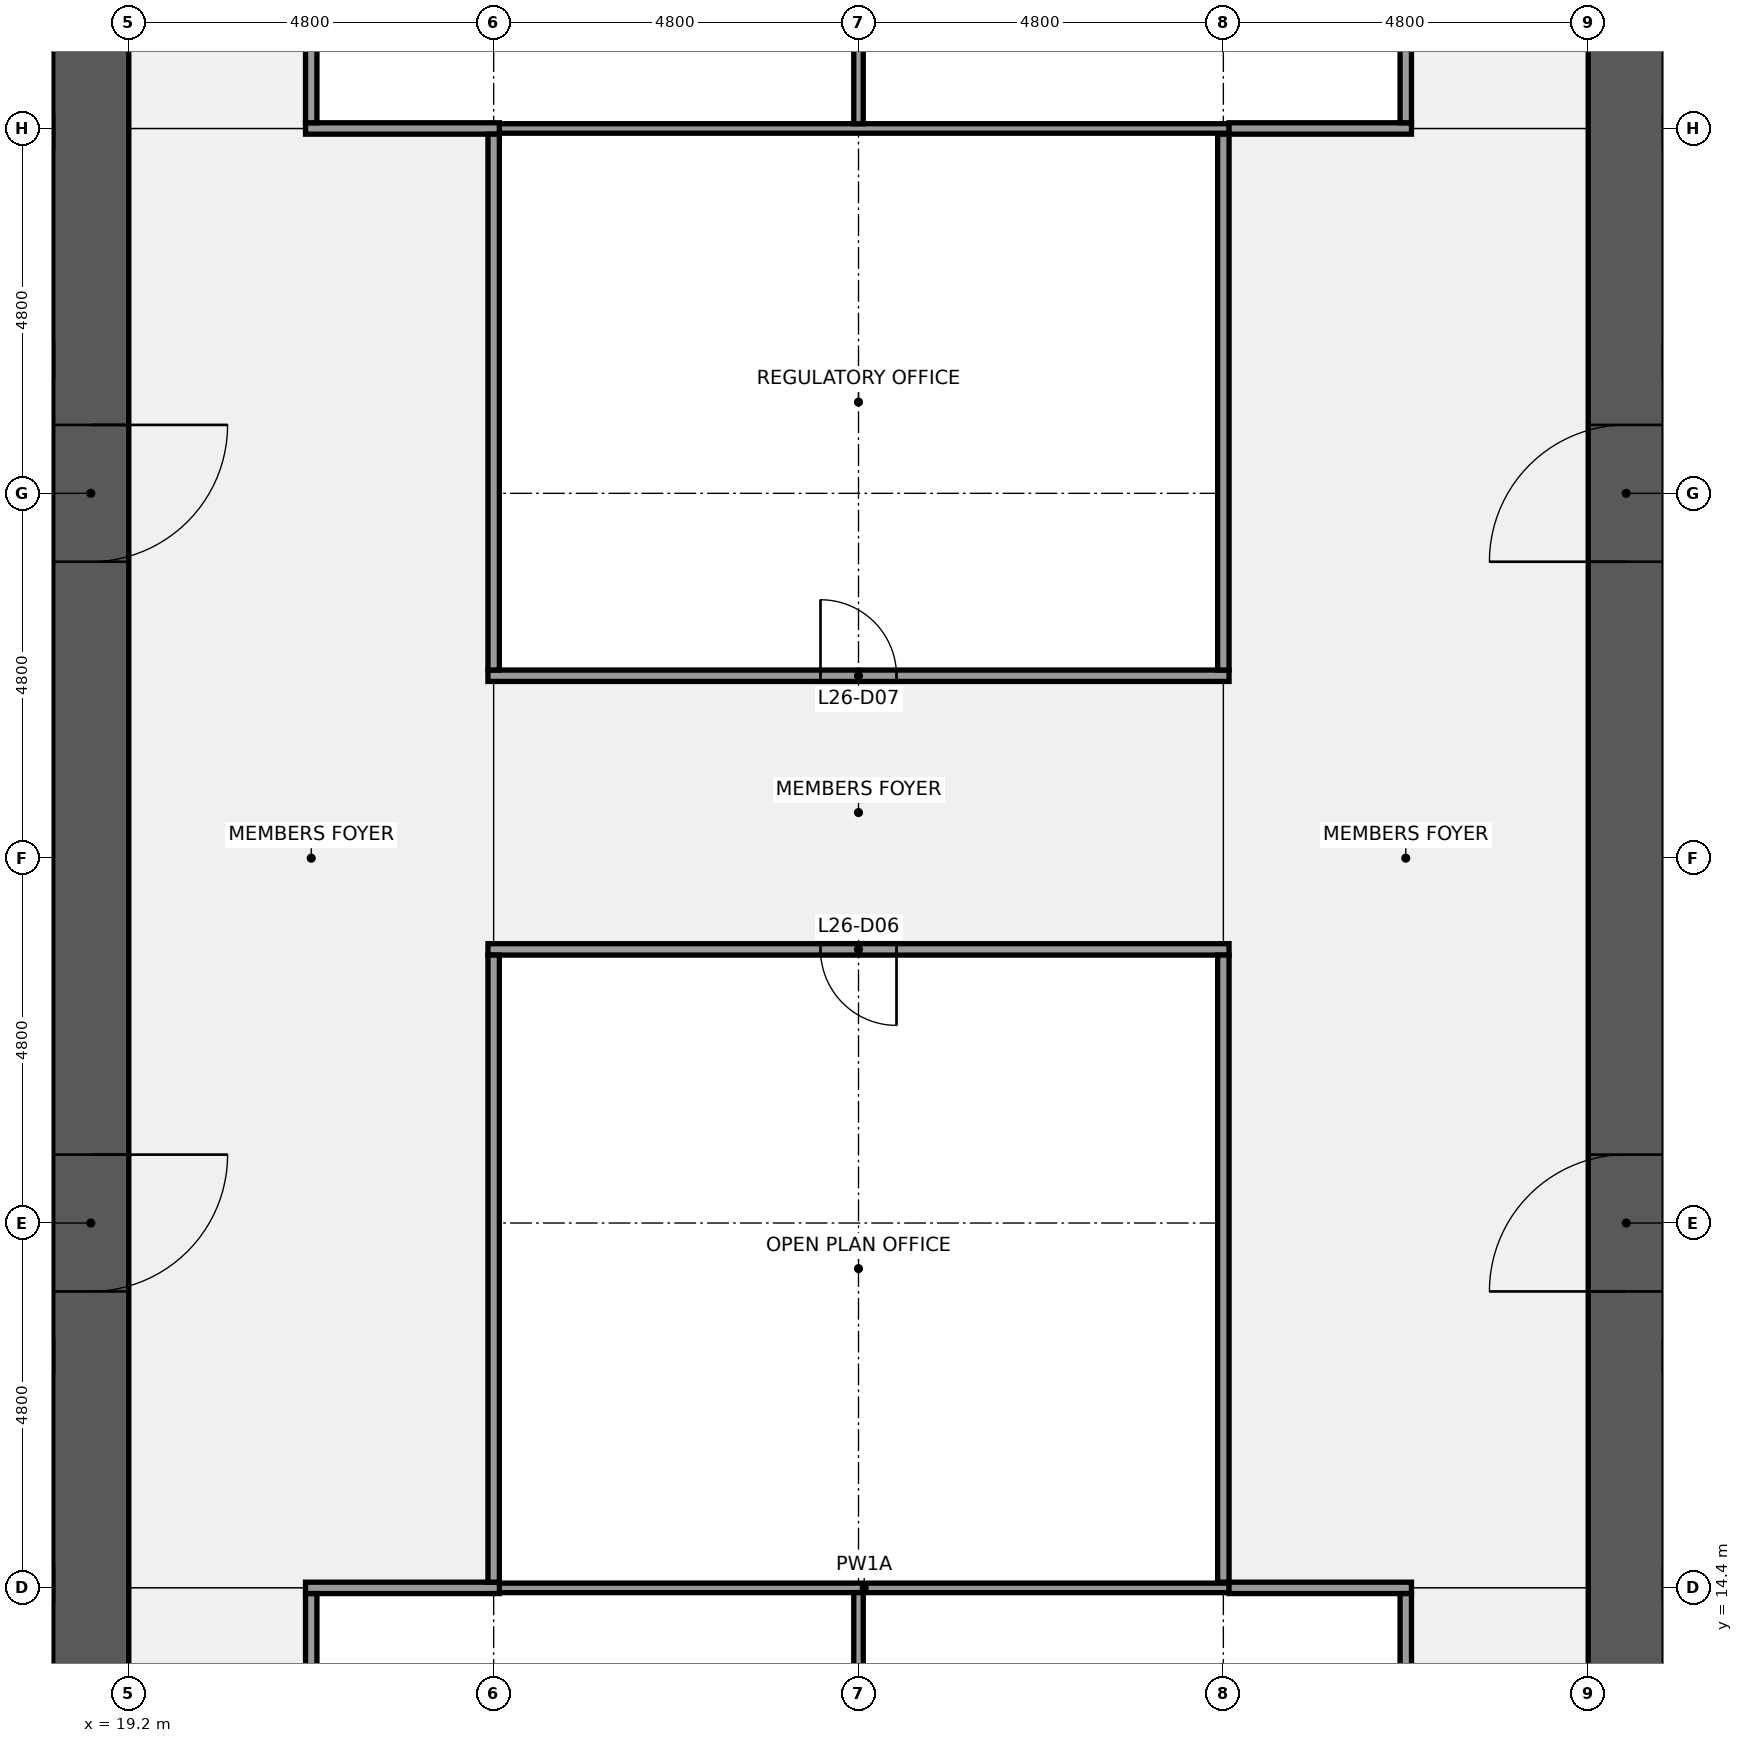
"""IFC4 building model, lengths in metres.
Left out: names, types, materials, properties, quantities, classifications, styles, units other than length and angle.
Written with IfcOpenShell. Run it as: python <this file> out.ifc"""

import sys

from ifc_helpers import new_model, si_unit, direction, frame, frame_2d, origin, place, context, subcontext, project, spatial, rectangle, extrude, element, fill, save


model = new_model("IFC4")
c1 = context("Model", 3, precision=1e-05, world=origin(), true_north=direction((0.0, 1.0)))
c2 = subcontext(c1, "Body", "Model", "MODEL_VIEW")
j1 = project(units=[si_unit("LENGTHUNIT", "METRE"), si_unit("PLANEANGLEUNIT", "RADIAN")], contexts=[c1])
p1 = place(None, origin())
s1 = spatial("IfcSite", under=j1, at=p1, CompositionType="ELEMENT")
p2 = place(p1, origin())
s2 = spatial("IfcBuilding", under=s1, at=p2, CompositionType="ELEMENT")
p3 = place(p2, frame((0.0, 0.0, 124.1)))
s3 = spatial("IfcBuildingStorey", under=s2, at=p3, CompositionType="ELEMENT", Elevation=124.1)
p4 = place(p3, frame((18.7, 38.4, 0.0), z_axis=(0.0, 0.0, 1.0), x_axis=(0.0, -1.0, 0.0)))
e1 = element("IfcWall", 1, at=p4, inside=s3, PredefinedType="SHEAR", context=c2, shape_type="SweptSolid", body=[
    extrude(rectangle(XDim=28.8, YDim=1.0, at=frame_2d((14.4, 0.0))), origin(), (0.0, 0.0, 1.0), 3.84),
])
p5 = place(p4, frame((18.3, 0.0, 0.0)))
e2 = element("IfcOpeningElement", 2, at=p5, cuts=e1, PredefinedType="OPENING", context=c2, shape_type="SweptSolid", body=[
    extrude(rectangle(XDim=1.8, YDim=2.1, at=frame_2d((0.9, 1.05))), frame((0.0, 0.51, 0.0), z_axis=(0.0, -1.0, 0.0), x_axis=(1.0, 0.0, 0.0)), (0.0, 0.0, 1.0), 1.02),
])
p6 = place(p4, frame((8.7, 0.0, 0.0)))
e3 = element("IfcOpeningElement", 3, at=p6, cuts=e1, PredefinedType="OPENING", context=c2, shape_type="SweptSolid", body=[
    extrude(rectangle(XDim=1.8, YDim=2.1, at=frame_2d((0.9, 1.05))), frame((0.0, 0.51, 0.0), z_axis=(0.0, -1.0, 0.0), x_axis=(1.0, 0.0, 0.0)), (0.0, 0.0, 1.0), 1.02),
])
p7 = place(p3, frame((1.0, 14.45, 0.0), z_axis=(0.0, 0.0, 1.0), x_axis=(1.0, 0.0, 0.0)))
e4 = element("IfcWall", 4, at=p7, inside=s3, PredefinedType="SHEAR", context=c2, shape_type="SweptSolid", body=[
    extrude(rectangle(XDim=17.2, YDim=0.4, at=frame_2d((8.6, 0.0))), origin(), (0.0, 0.0, 1.0), 3.84),
])
p8 = place(p3, frame((1.0, 17.45, 0.0), z_axis=(0.0, 0.0, 1.0), x_axis=(1.0, 0.0, 0.0)))
e5 = element("IfcWall", 5, at=p8, inside=s3, PredefinedType="SHEAR", context=c2, shape_type="SweptSolid", body=[
    extrude(rectangle(XDim=17.2, YDim=0.4, at=frame_2d((8.6, 0.0))), origin(), (0.0, 0.0, 1.0), 3.84),
])
p9 = place(p8, frame((0.762, 0.0, 0.0)))
e6 = element("IfcOpeningElement", 6, at=p9, cuts=e5, PredefinedType="OPENING", context=c2, shape_type="SweptSolid", body=[
    extrude(rectangle(XDim=1.0, YDim=2.1, at=frame_2d((0.5, 1.05))), frame((0.0, 0.21, 0.0), z_axis=(0.0, -1.0, 0.0), x_axis=(1.0, 0.0, 0.0)), (0.0, 0.0, 1.0), 0.42),
])
p10 = place(p8, frame((4.5, 0.0, 0.0)))
e7 = element("IfcOpeningElement", 7, at=p10, cuts=e5, PredefinedType="OPENING", context=c2, shape_type="SweptSolid", body=[
    extrude(rectangle(XDim=1.0, YDim=2.1, at=frame_2d((0.5, 1.05))), frame((0.0, 0.21, 0.0), z_axis=(0.0, -1.0, 0.0), x_axis=(1.0, 0.0, 0.0)), (0.0, 0.0, 1.0), 0.42),
])
p11 = place(p8, frame((8.4, 0.0, 0.0)))
e8 = element("IfcOpeningElement", 8, at=p11, cuts=e5, PredefinedType="OPENING", context=c2, shape_type="SweptSolid", body=[
    extrude(rectangle(XDim=1.0, YDim=2.1, at=frame_2d((0.5, 1.05))), frame((0.0, 0.21, 0.0), z_axis=(0.0, -1.0, 0.0), x_axis=(1.0, 0.0, 0.0)), (0.0, 0.0, 1.0), 0.42),
])
p12 = place(p8, frame((11.4, 0.0, 0.0)))
e9 = element("IfcOpeningElement", 9, at=p12, cuts=e5, PredefinedType="OPENING", context=c2, shape_type="SweptSolid", body=[
    extrude(rectangle(XDim=1.0, YDim=2.1, at=frame_2d((0.5, 1.05))), frame((0.0, 0.21, 0.0), z_axis=(0.0, -1.0, 0.0), x_axis=(1.0, 0.0, 0.0)), (0.0, 0.0, 1.0), 0.42),
])
p13 = place(p8, frame((14.837, 0.0, 0.0)))
e10 = element("IfcOpeningElement", 10, at=p13, cuts=e5, PredefinedType="OPENING", context=c2, shape_type="SweptSolid", body=[
    extrude(rectangle(XDim=1.0, YDim=2.1, at=frame_2d((0.5, 1.05))), frame((0.0, 0.21, 0.0), z_axis=(0.0, -1.0, 0.0), x_axis=(1.0, 0.0, 0.0)), (0.0, 0.0, 1.0), 0.42),
])
p14 = place(p3, frame((1.0, 30.55, 0.0), z_axis=(0.0, 0.0, 1.0), x_axis=(1.0, 0.0, 0.0)))
e11 = element("IfcWall", 11, at=p14, inside=s3, PredefinedType="SHEAR", context=c2, shape_type="SweptSolid", body=[
    extrude(rectangle(XDim=17.2, YDim=0.4, at=frame_2d((8.6, 0.0))), origin(), (0.0, 0.0, 1.0), 3.84),
])
p15 = place(p14, frame((1.663, 0.0, 0.0)))
e12 = element("IfcOpeningElement", 12, at=p15, cuts=e11, PredefinedType="OPENING", context=c2, shape_type="SweptSolid", body=[
    extrude(rectangle(XDim=1.0, YDim=2.1, at=frame_2d((0.5, 1.05))), frame((0.0, 0.21, 0.0), z_axis=(0.0, -1.0, 0.0), x_axis=(1.0, 0.0, 0.0)), (0.0, 0.0, 1.0), 0.42),
])
p16 = place(p14, frame((5.7, 0.0, 0.0)))
e13 = element("IfcOpeningElement", 13, at=p16, cuts=e11, PredefinedType="OPENING", context=c2, shape_type="SweptSolid", body=[
    extrude(rectangle(XDim=1.0, YDim=2.1, at=frame_2d((0.5, 1.05))), frame((0.0, 0.21, 0.0), z_axis=(0.0, -1.0, 0.0), x_axis=(1.0, 0.0, 0.0)), (0.0, 0.0, 1.0), 0.42),
])
p17 = place(p14, frame((9.0, 0.0, 0.0)))
e14 = element("IfcOpeningElement", 14, at=p17, cuts=e11, PredefinedType="OPENING", context=c2, shape_type="SweptSolid", body=[
    extrude(rectangle(XDim=1.0, YDim=2.1, at=frame_2d((0.5, 1.05))), frame((0.0, 0.21, 0.0), z_axis=(0.0, -1.0, 0.0), x_axis=(1.0, 0.0, 0.0)), (0.0, 0.0, 1.0), 0.42),
])
p18 = place(p14, frame((11.7, 0.0, 0.0)))
e15 = element("IfcOpeningElement", 15, at=p18, cuts=e11, PredefinedType="OPENING", context=c2, shape_type="SweptSolid", body=[
    extrude(rectangle(XDim=1.0, YDim=2.1, at=frame_2d((0.5, 1.05))), frame((0.0, 0.21, 0.0), z_axis=(0.0, -1.0, 0.0), x_axis=(1.0, 0.0, 0.0)), (0.0, 0.0, 1.0), 0.42),
])
p19 = place(p14, frame((14.837, 0.0, 0.0)))
e16 = element("IfcOpeningElement", 16, at=p19, cuts=e11, PredefinedType="OPENING", context=c2, shape_type="SweptSolid", body=[
    extrude(rectangle(XDim=1.0, YDim=2.1, at=frame_2d((0.5, 1.05))), frame((0.0, 0.21, 0.0), z_axis=(0.0, -1.0, 0.0), x_axis=(1.0, 0.0, 0.0)), (0.0, 0.0, 1.0), 0.42),
])
p20 = place(p3, frame((1.0, 33.55, 0.0), z_axis=(0.0, 0.0, 1.0), x_axis=(1.0, 0.0, 0.0)))
e17 = element("IfcWall", 17, at=p20, inside=s3, PredefinedType="SHEAR", context=c2, shape_type="SweptSolid", body=[
    extrude(rectangle(XDim=17.2, YDim=0.4, at=frame_2d((8.6, 0.0))), origin(), (0.0, 0.0, 1.0), 3.84),
])
p21 = place(p3, frame((38.9, 9.6, 0.0), z_axis=(0.0, 0.0, 1.0), x_axis=(0.0, 1.0, 0.0)))
e18 = element("IfcWall", 18, at=p21, inside=s3, PredefinedType="SHEAR", context=c2, shape_type="SweptSolid", body=[
    extrude(rectangle(XDim=28.8, YDim=1.0, at=frame_2d((14.4, 0.0))), origin(), (0.0, 0.0, 1.0), 3.84),
])
p22 = place(p21, frame((8.7, 0.0, 0.0)))
e19 = element("IfcOpeningElement", 19, at=p22, cuts=e18, PredefinedType="OPENING", context=c2, shape_type="SweptSolid", body=[
    extrude(rectangle(XDim=1.8, YDim=2.1, at=frame_2d((0.9, 1.05))), frame((0.0, 0.51, 0.0), z_axis=(0.0, -1.0, 0.0), x_axis=(1.0, 0.0, 0.0)), (0.0, 0.0, 1.0), 1.02),
])
p23 = place(p21, frame((18.3, 0.0, 0.0)))
e20 = element("IfcOpeningElement", 20, at=p23, cuts=e18, PredefinedType="OPENING", context=c2, shape_type="SweptSolid", body=[
    extrude(rectangle(XDim=1.8, YDim=2.1, at=frame_2d((0.9, 1.05))), frame((0.0, 0.51, 0.0), z_axis=(0.0, -1.0, 0.0), x_axis=(1.0, 0.0, 0.0)), (0.0, 0.0, 1.0), 1.02),
])
p24 = place(p3, frame((24.075, 14.4, 0.0), z_axis=(0.0, 0.0, 1.0), x_axis=(1.0, 0.0, 0.0)))
e21 = element("IfcWall", 21, at=p24, inside=s3, PredefinedType="PARTITIONING", context=c2, shape_type="SweptSolid", body=[
    extrude(rectangle(XDim=9.6, YDim=0.125, at=frame_2d((4.8, 0.0))), origin(), (0.0, 0.0, 1.0), 2.849),
])
p25 = place(p3, frame((21.525, 14.4, 0.0), z_axis=(0.0, 0.0, 1.0), x_axis=(1.0, 0.0, 0.0)))
e22 = element("IfcWall", 22, at=p25, inside=s3, PredefinedType="PARTITIONING", context=c2, shape_type="SweptSolid", body=[
    extrude(rectangle(XDim=2.55, YDim=0.15, at=frame_2d((1.275, 0.0))), origin(), (0.0, 0.0, 1.0), 2.849),
])
p26 = place(p3, frame((33.675, 14.4, 0.0), z_axis=(0.0, 0.0, 1.0), x_axis=(1.0, 0.0, 0.0)))
e23 = element("IfcWall", 23, at=p26, inside=s3, PredefinedType="PARTITIONING", context=c2, shape_type="SweptSolid", body=[
    extrude(rectangle(XDim=2.4, YDim=0.15, at=frame_2d((1.2, 0.0))), origin(), (0.0, 0.0, 1.0), 2.849),
])
p27 = place(p3, frame((23.925, 22.8, 0.0), z_axis=(0.0, 0.0, 1.0), x_axis=(1.0, 0.0, 0.0)))
e24 = element("IfcWall", 24, at=p27, inside=s3, PredefinedType="PARTITIONING", context=c2, shape_type="SweptSolid", body=[
    extrude(rectangle(XDim=9.75, YDim=0.15, at=frame_2d((4.875, 0.0))), origin(), (0.0, 0.0, 1.0), 2.849),
])
p28 = place(p27, frame((4.375, 0.0, 0.0)))
e25 = element("IfcOpeningElement", 25, at=p28, cuts=e24, PredefinedType="OPENING", context=c2, shape_type="SweptSolid", body=[
    extrude(rectangle(XDim=1.0, YDim=2.1, at=frame_2d((0.5, 1.05))), frame((0.0, 0.085, 0.0), z_axis=(0.0, -1.0, 0.0), x_axis=(1.0, 0.0, 0.0)), (0.0, 0.0, 1.0), 0.17),
])
p29 = place(p3, frame((23.925, 26.4, 0.0), z_axis=(0.0, 0.0, 1.0), x_axis=(1.0, 0.0, 0.0)))
e26 = element("IfcWall", 26, at=p29, inside=s3, PredefinedType="PARTITIONING", context=c2, shape_type="SweptSolid", body=[
    extrude(rectangle(XDim=9.75, YDim=0.15, at=frame_2d((4.875, 0.0))), origin(), (0.0, 0.0, 1.0), 2.849),
])
p30 = place(p29, frame((4.375, 0.0, 0.0)))
e27 = element("IfcOpeningElement", 27, at=p30, cuts=e26, PredefinedType="OPENING", context=c2, shape_type="SweptSolid", body=[
    extrude(rectangle(XDim=1.0, YDim=2.1, at=frame_2d((0.5, 1.05))), frame((0.0, 0.085, 0.0), z_axis=(0.0, -1.0, 0.0), x_axis=(1.0, 0.0, 0.0)), (0.0, 0.0, 1.0), 0.17),
])
p31 = place(p3, frame((24.075, 33.6, 0.0), z_axis=(0.0, 0.0, 1.0), x_axis=(1.0, 0.0, 0.0)))
e28 = element("IfcWall", 28, at=p31, inside=s3, PredefinedType="PARTITIONING", context=c2, shape_type="SweptSolid", body=[
    extrude(rectangle(XDim=9.6, YDim=0.125, at=frame_2d((4.8, 0.0))), origin(), (0.0, 0.0, 1.0), 2.849),
])
p32 = place(p3, frame((21.525, 33.6, 0.0), z_axis=(0.0, 0.0, 1.0), x_axis=(1.0, 0.0, 0.0)))
e29 = element("IfcWall", 29, at=p32, inside=s3, PredefinedType="PARTITIONING", context=c2, shape_type="SweptSolid", body=[
    extrude(rectangle(XDim=2.55, YDim=0.15, at=frame_2d((1.275, 0.0))), origin(), (0.0, 0.0, 1.0), 2.849),
])
p33 = place(p3, frame((33.675, 33.6, 0.0), z_axis=(0.0, 0.0, 1.0), x_axis=(1.0, 0.0, 0.0)))
e30 = element("IfcWall", 30, at=p33, inside=s3, PredefinedType="PARTITIONING", context=c2, shape_type="SweptSolid", body=[
    extrude(rectangle(XDim=2.4, YDim=0.15, at=frame_2d((1.2, 0.0))), origin(), (0.0, 0.0, 1.0), 2.849),
])
for number, where, z_axis, x_axis in (
    (31, (21.6, 9.675, 0.0), (0.0, 0.0, 1.0), (0.0, 1.0, 0.0)),
    (32, (21.6, 33.675, 0.0), (0.0, 0.0, 1.0), (0.0, 1.0, 0.0)),
):
    element("IfcWall", number, at=place(p3, frame(where, z_axis=z_axis, x_axis=x_axis)), inside=s3, PredefinedType="PARTITIONING", context=c2, shape_type="SweptSolid", body=[
        extrude(rectangle(XDim=4.65, YDim=0.15, at=frame_2d((2.325, 0.0))), origin(), (0.0, 0.0, 1.0), 2.849),
    ])
p34 = place(p3, frame((24.0, 14.475, 0.0), z_axis=(0.0, 0.0, 1.0), x_axis=(0.0, 1.0, 0.0)))
e33 = element("IfcWall", 33, at=p34, inside=s3, PredefinedType="PARTITIONING", context=c2, shape_type="SweptSolid", body=[
    extrude(rectangle(XDim=8.25, YDim=0.15, at=frame_2d((4.125, 0.0))), origin(), (0.0, 0.0, 1.0), 2.849),
])
p35 = place(p3, frame((24.0, 26.475, 0.0), z_axis=(0.0, 0.0, 1.0), x_axis=(0.0, 1.0, 0.0)))
e34 = element("IfcWall", 34, at=p35, inside=s3, PredefinedType="PARTITIONING", context=c2, shape_type="SweptSolid", body=[
    extrude(rectangle(XDim=7.05, YDim=0.15, at=frame_2d((3.525, 0.0))), origin(), (0.0, 0.0, 1.0), 2.849),
])
for number, where, z_axis, x_axis in (
    (35, (28.8, 9.675, 0.0), (0.0, 0.0, 1.0), (0.0, 1.0, 0.0)),
    (36, (28.8, 33.663, 0.0), (0.0, 0.0, 1.0), (0.0, 1.0, 0.0)),
):
    element("IfcWall", number, at=place(p3, frame(where, z_axis=z_axis, x_axis=x_axis)), inside=s3, PredefinedType="PARTITIONING", context=c2, shape_type="SweptSolid", body=[
        extrude(rectangle(XDim=4.662, YDim=0.125, at=frame_2d((2.331, 0.0))), origin(), (0.0, 0.0, 1.0), 2.849),
    ])
p36 = place(p3, frame((33.6, 14.475, 0.0), z_axis=(0.0, 0.0, 1.0), x_axis=(0.0, 1.0, 0.0)))
e37 = element("IfcWall", 37, at=p36, inside=s3, PredefinedType="PARTITIONING", context=c2, shape_type="SweptSolid", body=[
    extrude(rectangle(XDim=8.25, YDim=0.15, at=frame_2d((4.125, 0.0))), origin(), (0.0, 0.0, 1.0), 2.849),
])
p37 = place(p3, frame((33.6, 26.475, 0.0), z_axis=(0.0, 0.0, 1.0), x_axis=(0.0, 1.0, 0.0)))
e38 = element("IfcWall", 38, at=p37, inside=s3, PredefinedType="PARTITIONING", context=c2, shape_type="SweptSolid", body=[
    extrude(rectangle(XDim=7.05, YDim=0.15, at=frame_2d((3.525, 0.0))), origin(), (0.0, 0.0, 1.0), 2.849),
])
for number, where, z_axis, x_axis in (
    (39, (36.0, 9.675, 0.0), (0.0, 0.0, 1.0), (0.0, 1.0, 0.0)),
    (40, (36.0, 33.675, 0.0), (0.0, 0.0, 1.0), (0.0, 1.0, 0.0)),
):
    element("IfcWall", number, at=place(p3, frame(where, z_axis=z_axis, x_axis=x_axis)), inside=s3, PredefinedType="PARTITIONING", context=c2, shape_type="SweptSolid", body=[
        extrude(rectangle(XDim=4.65, YDim=0.15, at=frame_2d((2.325, 0.0))), origin(), (0.0, 0.0, 1.0), 2.849),
    ])
p38 = place(p5, origin())
e41 = element("IfcDoor", 41, at=p38, inside=s3, OperationType="DOUBLE_DOOR_SINGLE_SWING", PredefinedType="DOOR", context=c2, shape_type="SweptSolid", body=[
    extrude(rectangle(XDim=1.8, YDim=2.1, at=frame_2d((0.9, 1.05))), frame((0.0, 0.025, 0.0), z_axis=(0.0, -1.0, 0.0), x_axis=(1.0, 0.0, 0.0)), (0.0, 0.0, 1.0), 0.05),
])
fill(e2, e41)
p39 = place(p6, origin())
e42 = element("IfcDoor", 42, at=p39, inside=s3, OperationType="DOUBLE_DOOR_SINGLE_SWING", PredefinedType="DOOR", context=c2, shape_type="SweptSolid", body=[
    extrude(rectangle(XDim=1.8, YDim=2.1, at=frame_2d((0.9, 1.05))), frame((0.0, 0.025, 0.0), z_axis=(0.0, -1.0, 0.0), x_axis=(1.0, 0.0, 0.0)), (0.0, 0.0, 1.0), 0.05),
])
fill(e3, e42)
p40 = place(p22, origin())
e43 = element("IfcDoor", 43, at=p40, inside=s3, OperationType="DOUBLE_DOOR_SINGLE_SWING", PredefinedType="DOOR", context=c2, shape_type="SweptSolid", body=[
    extrude(rectangle(XDim=1.8, YDim=2.1, at=frame_2d((0.9, 1.05))), frame((0.0, 0.025, 0.0), z_axis=(0.0, -1.0, 0.0), x_axis=(1.0, 0.0, 0.0)), (0.0, 0.0, 1.0), 0.05),
])
fill(e19, e43)
p41 = place(p23, origin())
e44 = element("IfcDoor", 44, at=p41, inside=s3, OperationType="DOUBLE_DOOR_SINGLE_SWING", PredefinedType="DOOR", context=c2, shape_type="SweptSolid", body=[
    extrude(rectangle(XDim=1.8, YDim=2.1, at=frame_2d((0.9, 1.05))), frame((0.0, 0.025, 0.0), z_axis=(0.0, -1.0, 0.0), x_axis=(1.0, 0.0, 0.0)), (0.0, 0.0, 1.0), 0.05),
])
fill(e20, e44)
p42 = place(p28, origin())
e45 = element("IfcDoor", 45, at=p42, inside=s3, OperationType="SINGLE_SWING_RIGHT", PredefinedType="DOOR", context=c2, shape_type="SweptSolid", body=[
    extrude(rectangle(XDim=1.0, YDim=2.1, at=frame_2d((0.5, 1.05))), frame((0.0, 0.025, 0.0), z_axis=(0.0, -1.0, 0.0), x_axis=(1.0, 0.0, 0.0)), (0.0, 0.0, 1.0), 0.05),
])
fill(e25, e45)
p43 = place(p30, origin())
e46 = element("IfcDoor", 46, at=p43, inside=s3, OperationType="SINGLE_SWING_LEFT", PredefinedType="DOOR", context=c2, shape_type="SweptSolid", body=[
    extrude(rectangle(XDim=1.0, YDim=2.1, at=frame_2d((0.5, 1.05))), frame((0.0, 0.025, 0.0), z_axis=(0.0, -1.0, 0.0), x_axis=(1.0, 0.0, 0.0)), (0.0, 0.0, 1.0), 0.05),
])
fill(e27, e46)
save(model, sys.argv[1])
